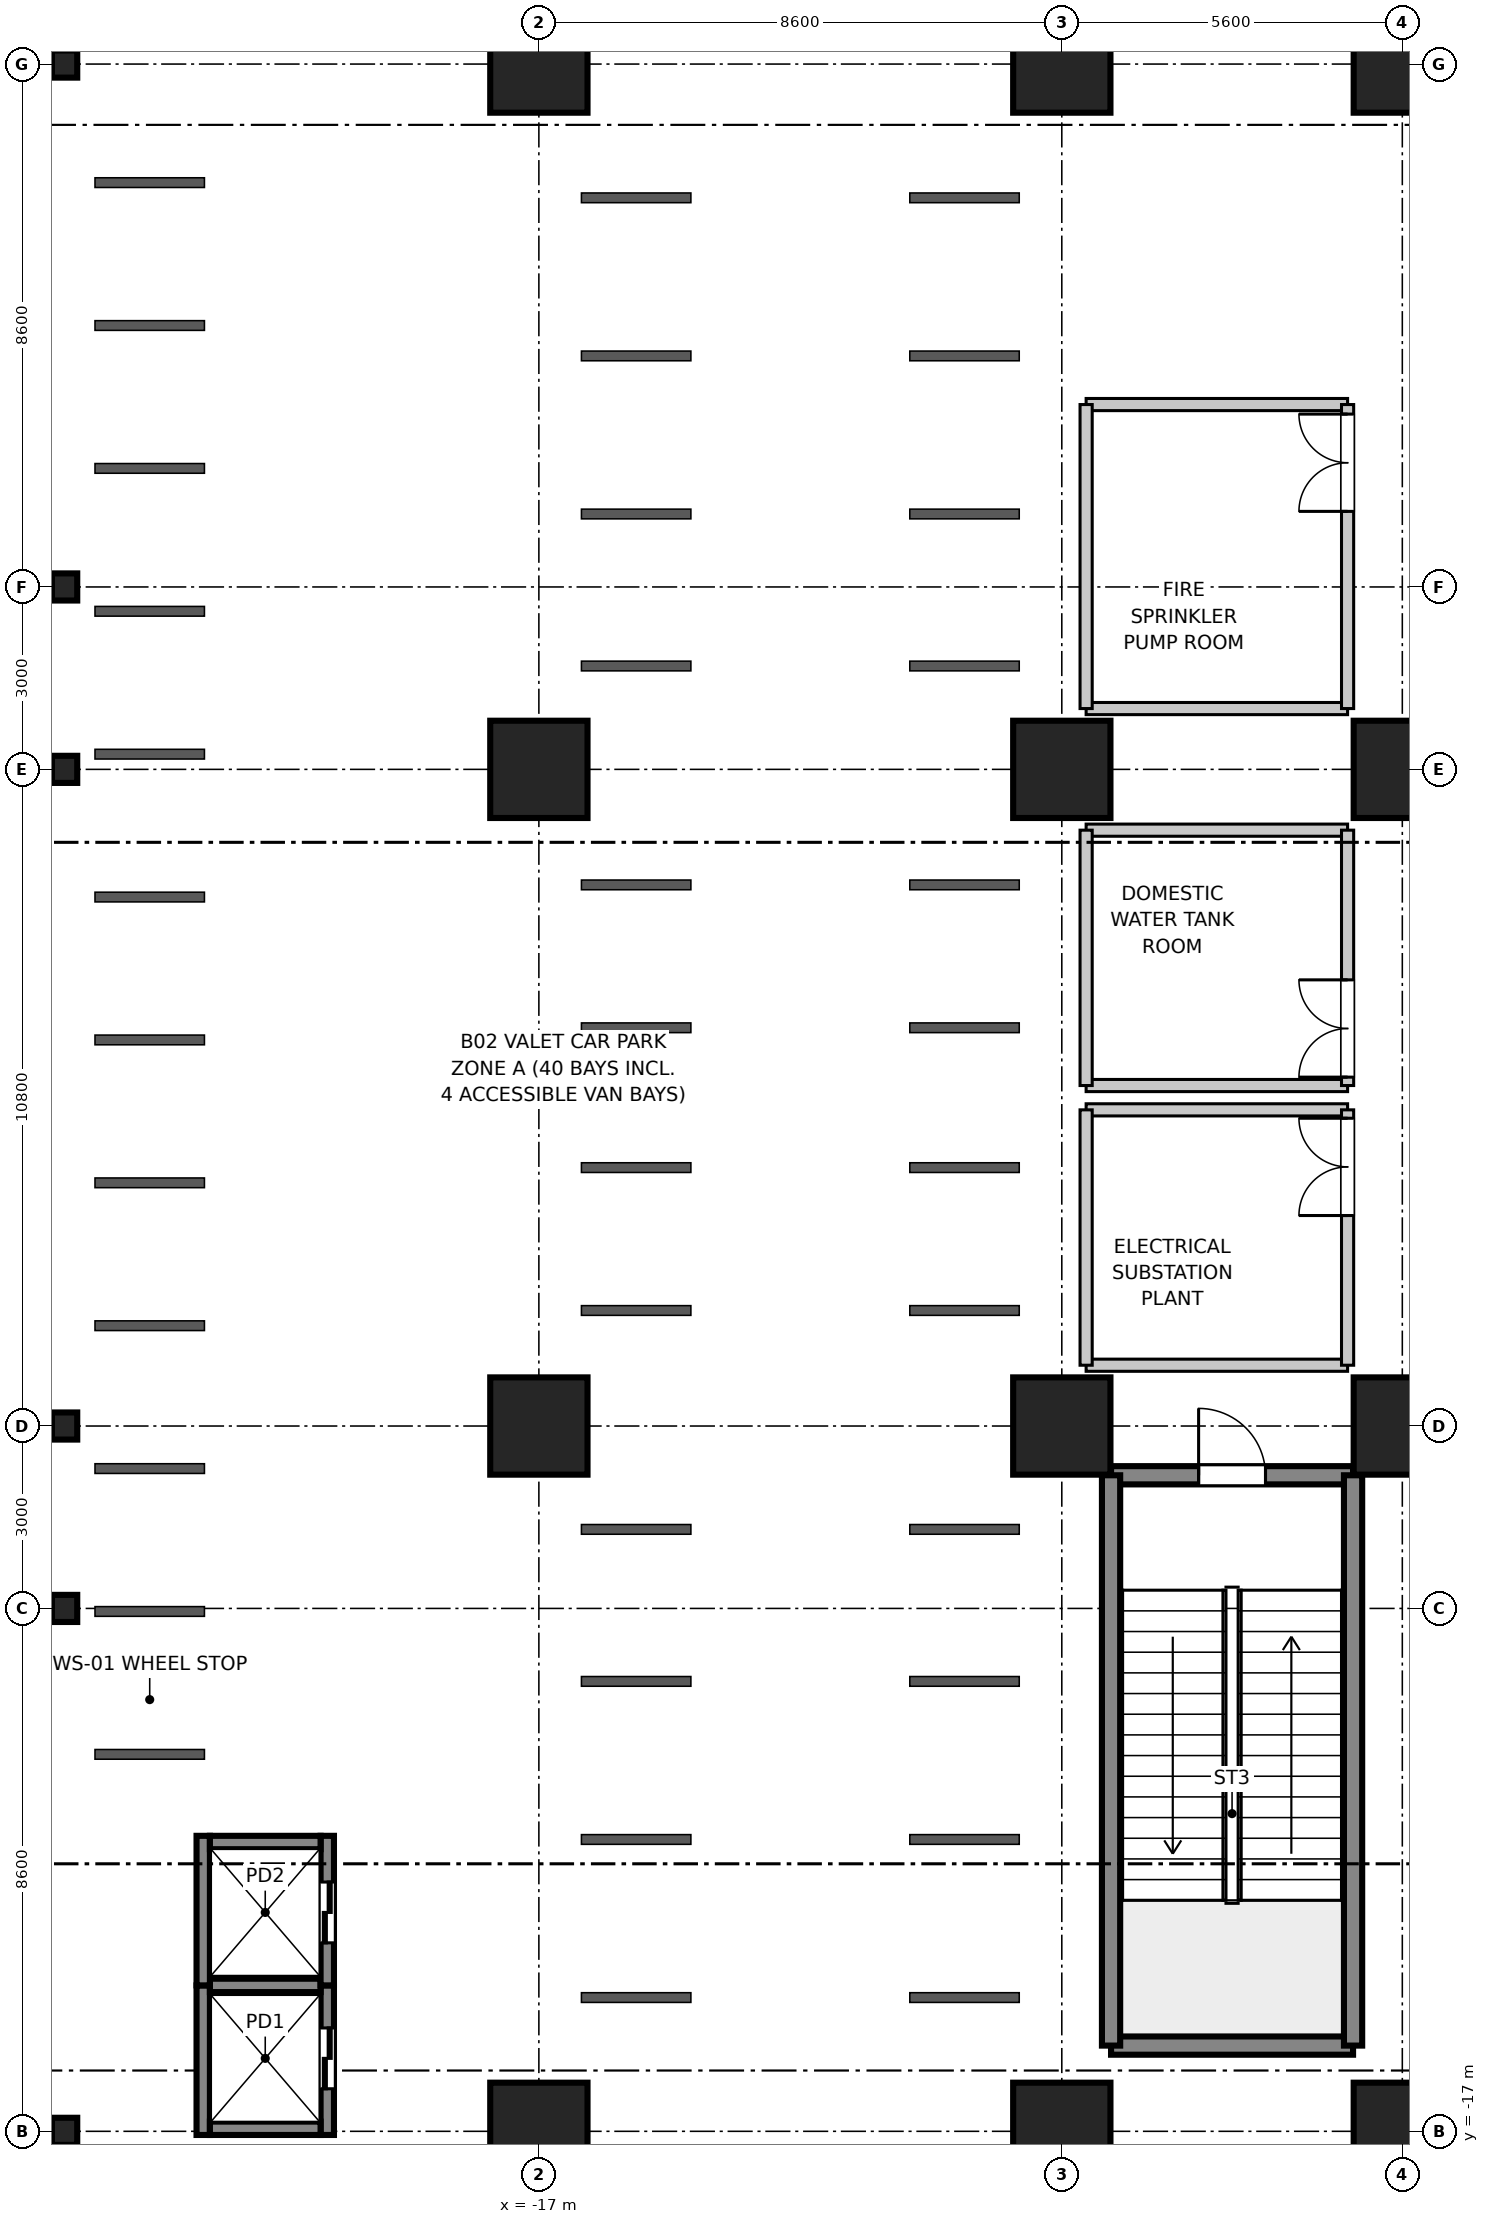
"""IFC4 building model, lengths in metres.
Left out: names, types, materials, properties, quantities, classifications, styles, units other than length and angle.
Written with IfcOpenShell. Run it as: python <this file> out.ifc"""

import sys

from ifc_helpers import new_model, si_unit, direction, frame, frame_2d, origin, origin_2d, place, context, subcontext, project, spatial, rectangle, i_section, extrude, source, transform, mapped, element, fill, save


model = new_model("IFC4")
c1 = context("Model", 3, precision=1e-05, world=origin(), true_north=direction((0.0, 1.0)))
c2 = subcontext(c1, "Body", "Model", "MODEL_VIEW")
j1 = project(units=[si_unit("LENGTHUNIT", "METRE"), si_unit("PLANEANGLEUNIT", "RADIAN")], contexts=[c1])
p1 = place(None, origin())
s1 = spatial("IfcSite", under=j1, at=p1, CompositionType="ELEMENT")
p2 = place(p1, origin())
s2 = spatial("IfcBuilding", under=s1, at=p2, CompositionType="ELEMENT")
p3 = place(p2, frame((0.0, 0.0, -10.8)))
s3 = spatial("IfcBuildingStorey", under=s2, at=p3, CompositionType="ELEMENT", Elevation=-10.8)
m1 = source(origin(), c2, "Body", "SweptSolid", [
    extrude(rectangle(XDim=1.6, YDim=1.6, at=origin_2d()), origin(), (0.0, 0.0, 1.0), 5.355),
])
for number, where, z_axis, x_axis in (
    (1, (-17.0, -17.0, 0.0), (0.0, 0.0, 1.0), (1.0, 0.0, 0.0)),
    (2, (-17.0, -5.4, 0.0), (0.0, 0.0, 1.0), (1.0, 0.0, 0.0)),
    (3, (-17.0, 5.4, 0.0), (0.0, 0.0, 1.0), (1.0, 0.0, 0.0)),
    (4, (-17.0, 17.0, 0.0), (0.0, 0.0, 1.0), (1.0, 0.0, 0.0)),
    (5, (-8.4, -17.0, 0.0), (0.0, 0.0, 1.0), (1.0, 0.0, 0.0)),
    (6, (-8.4, -5.4, 0.0), (0.0, 0.0, 1.0), (1.0, 0.0, 0.0)),
    (7, (-8.4, 5.4, 0.0), (0.0, 0.0, 1.0), (1.0, 0.0, 0.0)),
    (8, (-8.4, 17.0, 0.0), (0.0, 0.0, 1.0), (1.0, 0.0, 0.0)),
    (9, (-2.8, -17.0, 0.0), (0.0, 0.0, 1.0), (1.0, 0.0, 0.0)),
    (10, (-2.8, -5.4, 0.0), (0.0, 0.0, 1.0), (1.0, 0.0, 0.0)),
    (11, (-2.8, 5.4, 0.0), (0.0, 0.0, 1.0), (1.0, 0.0, 0.0)),
    (12, (-2.8, 17.0, 0.0), (0.0, 0.0, 1.0), (1.0, 0.0, 0.0)),
):
    element("IfcColumn", number, at=place(p3, frame(where, z_axis=z_axis, x_axis=x_axis)), inside=s3, PredefinedType="COLUMN", context=c2, shape_type="MappedRepresentation", body=[
        mapped(m1, transform((0.0, 0.0, 0.0), scale=1.0)),
    ])
m2 = source(origin(), c2, "Body", "SweptSolid", [
    extrude(i_section(OverallWidth=0.416, OverallDepth=0.446, WebThickness=0.025, FlangeThickness=0.04, at=origin_2d()), origin(), (0.0, 0.0, 1.0), 5.355),
])
for number, where, z_axis, x_axis in (
    (13, (-24.8, -17.0, 0.0), (0.0, 0.0, 1.0), (1.0, 0.0, 0.0)),
    (14, (-24.8, -8.4, 0.0), (0.0, 0.0, 1.0), (1.0, 0.0, 0.0)),
    (15, (-24.8, -5.4, 0.0), (0.0, 0.0, 1.0), (1.0, 0.0, 0.0)),
    (16, (-24.8, 5.4, 0.0), (0.0, 0.0, 1.0), (1.0, 0.0, 0.0)),
    (17, (-24.8, 8.4, 0.0), (0.0, 0.0, 1.0), (1.0, 0.0, 0.0)),
    (18, (-24.8, 17.0, 0.0), (0.0, 0.0, 1.0), (1.0, 0.0, 0.0)),
):
    element("IfcColumn", number, at=place(p3, frame(where, z_axis=z_axis, x_axis=x_axis)), inside=s3, PredefinedType="COLUMN", context=c2, shape_type="MappedRepresentation", body=[
        mapped(m2, transform((0.0, 0.0, 0.0), scale=1.0)),
    ])
m3 = source(origin(), c2, "Body", "SweptSolid", [
    extrude(rectangle(XDim=3.98, YDim=0.3, at=frame_2d((1.99, 0.0))), origin(), (0.0, 0.0, 1.0), 5.05),
])
p4 = place(p3, frame((-7.59, -15.59, 0.0), z_axis=(0.0, 0.0, 1.0), x_axis=(1.0, 0.0, 0.0)))
e19 = element("IfcWall", 19, at=p4, inside=s3, PredefinedType="SHEAR", context=c2, shape_type="MappedRepresentation", body=[
    mapped(m3, transform((0.0, 0.0, 0.0), scale=1.0)),
])
p5 = place(p3, frame((-7.59, -6.21, 0.0), z_axis=(0.0, 0.0, 1.0), x_axis=(1.0, 0.0, 0.0)))
e20 = element("IfcWall", 20, at=p5, inside=s3, PredefinedType="SHEAR", context=c2, shape_type="MappedRepresentation", body=[
    mapped(m3, transform((0.0, 0.0, 0.0), scale=1.0)),
])
p6 = place(p5, frame((1.44, 0.0, 0.0)))
e21 = element("IfcOpeningElement", 21, at=p6, cuts=e20, PredefinedType="OPENING", context=c2, shape_type="SweptSolid", body=[
    extrude(rectangle(XDim=1.1, YDim=2.15, at=frame_2d((0.55, 1.075))), frame((0.0, 0.16, 0.0), z_axis=(0.0, -1.0, 0.0), x_axis=(1.0, 0.0, 0.0)), (0.0, 0.0, 1.0), 0.32),
])
m4 = source(origin(), c2, "Body", "SweptSolid", [
    extrude(rectangle(XDim=9.38, YDim=0.3, at=frame_2d((4.69, 0.0))), origin(), (0.0, 0.0, 1.0), 5.05),
])
for number, where, z_axis, x_axis in (
    (22, (-7.59, -15.59, 0.0), (0.0, 0.0, 1.0), (0.0, 1.0, 0.0)),
    (23, (-3.61, -15.59, 0.0), (0.0, 0.0, 1.0), (0.0, 1.0, 0.0)),
):
    element("IfcWall", number, at=place(p3, frame(where, z_axis=z_axis, x_axis=x_axis)), inside=s3, PredefinedType="SHEAR", context=c2, shape_type="MappedRepresentation", body=[
        mapped(m4, transform((0.0, 0.0, 0.0), scale=1.0)),
    ])
m5 = source(origin(), c2, "Body", "SweptSolid", [
    extrude(rectangle(XDim=2.46, YDim=0.22, at=frame_2d((1.23, 0.0))), origin(), (0.0, 0.0, 1.0), 5.05),
])
p7 = place(p3, frame((-22.52, -17.06, 0.0), z_axis=(0.0, 0.0, 1.0), x_axis=(0.0, 1.0, 0.0)))
e24 = element("IfcWall", 24, at=p7, inside=s3, PredefinedType="SHEAR", context=c2, shape_type="MappedRepresentation", body=[
    mapped(m5, transform((0.0, 0.0, 0.0), scale=1.0)),
])
p8 = place(p3, frame((-20.48, -17.06, 0.0), z_axis=(0.0, 0.0, 1.0), x_axis=(0.0, 1.0, 0.0)))
e25 = element("IfcWall", 25, at=p8, inside=s3, PredefinedType="SHEAR", context=c2, shape_type="MappedRepresentation", body=[
    mapped(m5, transform((0.0, 0.0, 0.0), scale=1.0)),
])
p9 = place(p8, frame((0.76, 0.0, 0.0)))
e26 = element("IfcOpeningElement", 26, at=p9, cuts=e25, PredefinedType="OPENING", context=c2, shape_type="SweptSolid", body=[
    extrude(rectangle(XDim=1.0, YDim=2.2, at=frame_2d((0.5, 1.1))), frame((0.0, 0.12, 0.0), z_axis=(0.0, -1.0, 0.0), x_axis=(1.0, 0.0, 0.0)), (0.0, 0.0, 1.0), 0.24),
])
m6 = source(origin(), c2, "Body", "SweptSolid", [
    extrude(rectangle(XDim=1.82, YDim=0.22, at=frame_2d((0.91, 0.0))), origin(), (0.0, 0.0, 1.0), 5.05),
])
p10 = place(p3, frame((-22.41, -16.95, 0.0), z_axis=(0.0, 0.0, 1.0), x_axis=(1.0, 0.0, 0.0)))
e27 = element("IfcWall", 27, at=p10, inside=s3, PredefinedType="SHEAR", context=c2, shape_type="MappedRepresentation", body=[
    mapped(m6, transform((0.0, 0.0, 0.0), scale=1.0)),
])
m7 = source(origin(), c2, "Body", "SweptSolid", [
    extrude(rectangle(XDim=1.82, YDim=0.22, at=frame_2d((0.91, 0.0))), origin(), (0.0, 0.0, 1.0), 5.4),
])
p11 = place(p3, frame((-22.41, -14.6, 0.0), z_axis=(0.0, 0.0, 1.0), x_axis=(1.0, 0.0, 0.0)))
e28 = element("IfcWall", 28, at=p11, inside=s3, PredefinedType="SHEAR", context=c2, shape_type="MappedRepresentation", body=[
    mapped(m7, transform((0.0, 0.0, 0.0), scale=1.0)),
])
m8 = source(origin(), c2, "Body", "SweptSolid", [
    extrude(rectangle(XDim=2.46, YDim=0.22, at=frame_2d((1.23, 0.0))), origin(), (0.0, 0.0, 1.0), 5.05),
])
p12 = place(p3, frame((-22.52, -14.6, 0.0), z_axis=(0.0, 0.0, 1.0), x_axis=(0.0, 1.0, 0.0)))
e29 = element("IfcWall", 29, at=p12, inside=s3, PredefinedType="SHEAR", context=c2, shape_type="MappedRepresentation", body=[
    mapped(m8, transform((0.0, 0.0, 0.0), scale=1.0)),
])
p13 = place(p3, frame((-20.48, -14.6, 0.0), z_axis=(0.0, 0.0, 1.0), x_axis=(0.0, 1.0, 0.0)))
e30 = element("IfcWall", 30, at=p13, inside=s3, PredefinedType="SHEAR", context=c2, shape_type="MappedRepresentation", body=[
    mapped(m8, transform((0.0, 0.0, 0.0), scale=1.0)),
])
p14 = place(p13, frame((0.7, 0.0, 0.0)))
e31 = element("IfcOpeningElement", 31, at=p14, cuts=e30, PredefinedType="OPENING", context=c2, shape_type="SweptSolid", body=[
    extrude(rectangle(XDim=1.0, YDim=2.2, at=frame_2d((0.5, 1.1))), frame((0.0, 0.12, 0.0), z_axis=(0.0, -1.0, 0.0), x_axis=(1.0, 0.0, 0.0)), (0.0, 0.0, 1.0), 0.24),
])
p15 = place(p3, frame((-22.41, -12.25, 0.0), z_axis=(0.0, 0.0, 1.0), x_axis=(1.0, 0.0, 0.0)))
e32 = element("IfcWall", 32, at=p15, inside=s3, PredefinedType="SHEAR", context=c2, shape_type="MappedRepresentation", body=[
    mapped(m6, transform((0.0, 0.0, 0.0), scale=1.0)),
])
m9 = source(origin(), c2, "Body", "SweptSolid", [
    extrude(rectangle(XDim=4.3, YDim=0.2, at=frame_2d((2.15, 0.0))), origin(), (0.0, 0.0, 1.0), 3.4),
])
for number, where, z_axis, x_axis in (
    (33, (-8.0, -4.4, 0.0), (0.0, 0.0, 1.0), (1.0, 0.0, 0.0)),
    (34, (-8.0, -0.2, 0.0), (0.0, 0.0, 1.0), (1.0, 0.0, 0.0)),
):
    element("IfcWall", number, at=place(p3, frame(where, z_axis=z_axis, x_axis=x_axis)), inside=s3, PredefinedType="PARTITIONING", context=c2, shape_type="MappedRepresentation", body=[
        mapped(m9, transform((0.0, 0.0, 0.0), scale=1.0)),
    ])
m10 = source(origin(), c2, "Body", "SweptSolid", [
    extrude(rectangle(XDim=4.2, YDim=0.2, at=frame_2d((2.1, 0.0))), origin(), (0.0, 0.0, 1.0), 3.4),
])
p16 = place(p3, frame((-8.0, -4.4, 0.0), z_axis=(0.0, 0.0, 1.0), x_axis=(0.0, 1.0, 0.0)))
e35 = element("IfcWall", 35, at=p16, inside=s3, PredefinedType="PARTITIONING", context=c2, shape_type="MappedRepresentation", body=[
    mapped(m10, transform((0.0, 0.0, 0.0), scale=1.0)),
])
p17 = place(p3, frame((-3.7, -4.4, 0.0), z_axis=(0.0, 0.0, 1.0), x_axis=(0.0, 1.0, 0.0)))
e36 = element("IfcWall", 36, at=p17, inside=s3, PredefinedType="PARTITIONING", context=c2, shape_type="MappedRepresentation", body=[
    mapped(m10, transform((0.0, 0.0, 0.0), scale=1.0)),
])
p18 = place(p17, frame((2.462, 0.0, 0.0)))
e37 = element("IfcOpeningElement", 37, at=p18, cuts=e36, PredefinedType="OPENING", context=c2, shape_type="SweptSolid", body=[
    extrude(rectangle(XDim=1.6, YDim=2.15, at=frame_2d((0.8, 1.075))), frame((0.0, 0.11, 0.0), z_axis=(0.0, -1.0, 0.0), x_axis=(1.0, 0.0, 0.0)), (0.0, 0.0, 1.0), 0.22),
])
for number, where, z_axis, x_axis in (
    (38, (-8.0, 0.2, 0.0), (0.0, 0.0, 1.0), (1.0, 0.0, 0.0)),
    (39, (-8.0, 4.4, 0.0), (0.0, 0.0, 1.0), (1.0, 0.0, 0.0)),
):
    element("IfcWall", number, at=place(p3, frame(where, z_axis=z_axis, x_axis=x_axis)), inside=s3, PredefinedType="PARTITIONING", context=c2, shape_type="MappedRepresentation", body=[
        mapped(m9, transform((0.0, 0.0, 0.0), scale=1.0)),
    ])
p19 = place(p3, frame((-8.0, 0.2, 0.0), z_axis=(0.0, 0.0, 1.0), x_axis=(0.0, 1.0, 0.0)))
e40 = element("IfcWall", 40, at=p19, inside=s3, PredefinedType="PARTITIONING", context=c2, shape_type="MappedRepresentation", body=[
    mapped(m10, transform((0.0, 0.0, 0.0), scale=1.0)),
])
p20 = place(p3, frame((-3.7, 0.2, 0.0), z_axis=(0.0, 0.0, 1.0), x_axis=(0.0, 1.0, 0.0)))
e41 = element("IfcWall", 41, at=p20, inside=s3, PredefinedType="PARTITIONING", context=c2, shape_type="MappedRepresentation", body=[
    mapped(m10, transform((0.0, 0.0, 0.0), scale=1.0)),
])
p21 = place(p20, frame((0.138, 0.0, 0.0)))
e42 = element("IfcOpeningElement", 42, at=p21, cuts=e41, PredefinedType="OPENING", context=c2, shape_type="SweptSolid", body=[
    extrude(rectangle(XDim=1.6, YDim=2.15, at=frame_2d((0.8, 1.075))), frame((0.0, 0.11, 0.0), z_axis=(0.0, -1.0, 0.0), x_axis=(1.0, 0.0, 0.0)), (0.0, 0.0, 1.0), 0.22),
])
for number, where, z_axis, x_axis in (
    (43, (-8.0, 6.4, 0.0), (0.0, 0.0, 1.0), (1.0, 0.0, 0.0)),
    (44, (-8.0, 11.4, 0.0), (0.0, 0.0, 1.0), (1.0, 0.0, 0.0)),
):
    element("IfcWall", number, at=place(p3, frame(where, z_axis=z_axis, x_axis=x_axis)), inside=s3, PredefinedType="PARTITIONING", context=c2, shape_type="MappedRepresentation", body=[
        mapped(m9, transform((0.0, 0.0, 0.0), scale=1.0)),
    ])
m11 = source(origin(), c2, "Body", "SweptSolid", [
    extrude(rectangle(XDim=5.0, YDim=0.2, at=frame_2d((2.5, 0.0))), origin(), (0.0, 0.0, 1.0), 3.4),
])
p22 = place(p3, frame((-8.0, 6.4, 0.0), z_axis=(0.0, 0.0, 1.0), x_axis=(0.0, 1.0, 0.0)))
e45 = element("IfcWall", 45, at=p22, inside=s3, PredefinedType="PARTITIONING", context=c2, shape_type="MappedRepresentation", body=[
    mapped(m11, transform((0.0, 0.0, 0.0), scale=1.0)),
])
p23 = place(p3, frame((-3.7, 6.4, 0.0), z_axis=(0.0, 0.0, 1.0), x_axis=(0.0, 1.0, 0.0)))
e46 = element("IfcWall", 46, at=p23, inside=s3, PredefinedType="PARTITIONING", context=c2, shape_type="MappedRepresentation", body=[
    mapped(m11, transform((0.0, 0.0, 0.0), scale=1.0)),
])
p24 = place(p23, frame((3.243, 0.0, 0.0)))
e47 = element("IfcOpeningElement", 47, at=p24, cuts=e46, PredefinedType="OPENING", context=c2, shape_type="SweptSolid", body=[
    extrude(rectangle(XDim=1.6, YDim=2.15, at=frame_2d((0.8, 1.075))), frame((0.0, 0.11, 0.0), z_axis=(0.0, -1.0, 0.0), x_axis=(1.0, 0.0, 0.0)), (0.0, 0.0, 1.0), 0.22),
])
m12 = source(origin(), c2, "Body", "SweptSolid", [
    extrude(rectangle(XDim=1.1, YDim=2.15, at=frame_2d((0.55, 1.075))), frame((0.0, 0.025, 0.0), z_axis=(0.0, -1.0, 0.0), x_axis=(1.0, 0.0, 0.0)), (0.0, 0.0, 1.0), 0.05),
])
p25 = place(p6, frame((1.1, 0.0, 0.0), z_axis=(0.0, 0.0, 1.0), x_axis=(-1.0, 0.0, 0.0)))
e48 = element("IfcDoor", 48, at=p25, inside=s3, OperationType="SINGLE_SWING_LEFT", PredefinedType="DOOR", context=c2, shape_type="MappedRepresentation", body=[
    mapped(m12, transform((0.0, 0.0, 0.0), scale=1.0)),
])
fill(e21, e48)
m13 = source(origin(), c2, "Body", "SweptSolid", [
    extrude(rectangle(XDim=1.0, YDim=2.2, at=frame_2d((0.5, 1.1))), frame((0.0, 0.025, 0.0), z_axis=(0.0, -1.0, 0.0), x_axis=(1.0, 0.0, 0.0)), (0.0, 0.0, 1.0), 0.05),
])
p26 = place(p9, frame((1.0, 0.0, 0.0), z_axis=(0.0, 0.0, 1.0), x_axis=(-1.0, 0.0, 0.0)))
e49 = element("IfcDoor", 49, at=p26, inside=s3, OperationType="DOUBLE_DOOR_SLIDING", PredefinedType="DOOR", context=c2, shape_type="MappedRepresentation", body=[
    mapped(m13, transform((0.0, 0.0, 0.0), scale=1.0)),
])
fill(e26, e49)
p27 = place(p14, frame((1.0, 0.0, 0.0), z_axis=(0.0, 0.0, 1.0), x_axis=(-1.0, 0.0, 0.0)))
e50 = element("IfcDoor", 50, at=p27, inside=s3, OperationType="DOUBLE_DOOR_SLIDING", PredefinedType="DOOR", context=c2, shape_type="MappedRepresentation", body=[
    mapped(m13, transform((0.0, 0.0, 0.0), scale=1.0)),
])
fill(e31, e50)
m14 = source(origin(), c2, "Body", "SweptSolid", [
    extrude(rectangle(XDim=1.6, YDim=2.15, at=frame_2d((0.8, 1.075))), frame((0.0, 0.025, 0.0), z_axis=(0.0, -1.0, 0.0), x_axis=(1.0, 0.0, 0.0)), (0.0, 0.0, 1.0), 0.05),
])
p28 = place(p18, origin())
e51 = element("IfcDoor", 51, at=p28, inside=s3, OperationType="DOUBLE_DOOR_SINGLE_SWING", PredefinedType="DOOR", context=c2, shape_type="MappedRepresentation", body=[
    mapped(m14, transform((0.0, 0.0, 0.0), scale=1.0)),
])
fill(e37, e51)
p29 = place(p21, origin())
e52 = element("IfcDoor", 52, at=p29, inside=s3, OperationType="DOUBLE_DOOR_SINGLE_SWING", PredefinedType="DOOR", context=c2, shape_type="MappedRepresentation", body=[
    mapped(m14, transform((0.0, 0.0, 0.0), scale=1.0)),
])
fill(e42, e52)
p30 = place(p24, origin())
e53 = element("IfcDoor", 53, at=p30, inside=s3, OperationType="DOUBLE_DOOR_SINGLE_SWING", PredefinedType="DOOR", context=c2, shape_type="MappedRepresentation", body=[
    mapped(m14, transform((0.0, 0.0, 0.0), scale=1.0)),
])
fill(e47, e53)
save(model, sys.argv[1])
